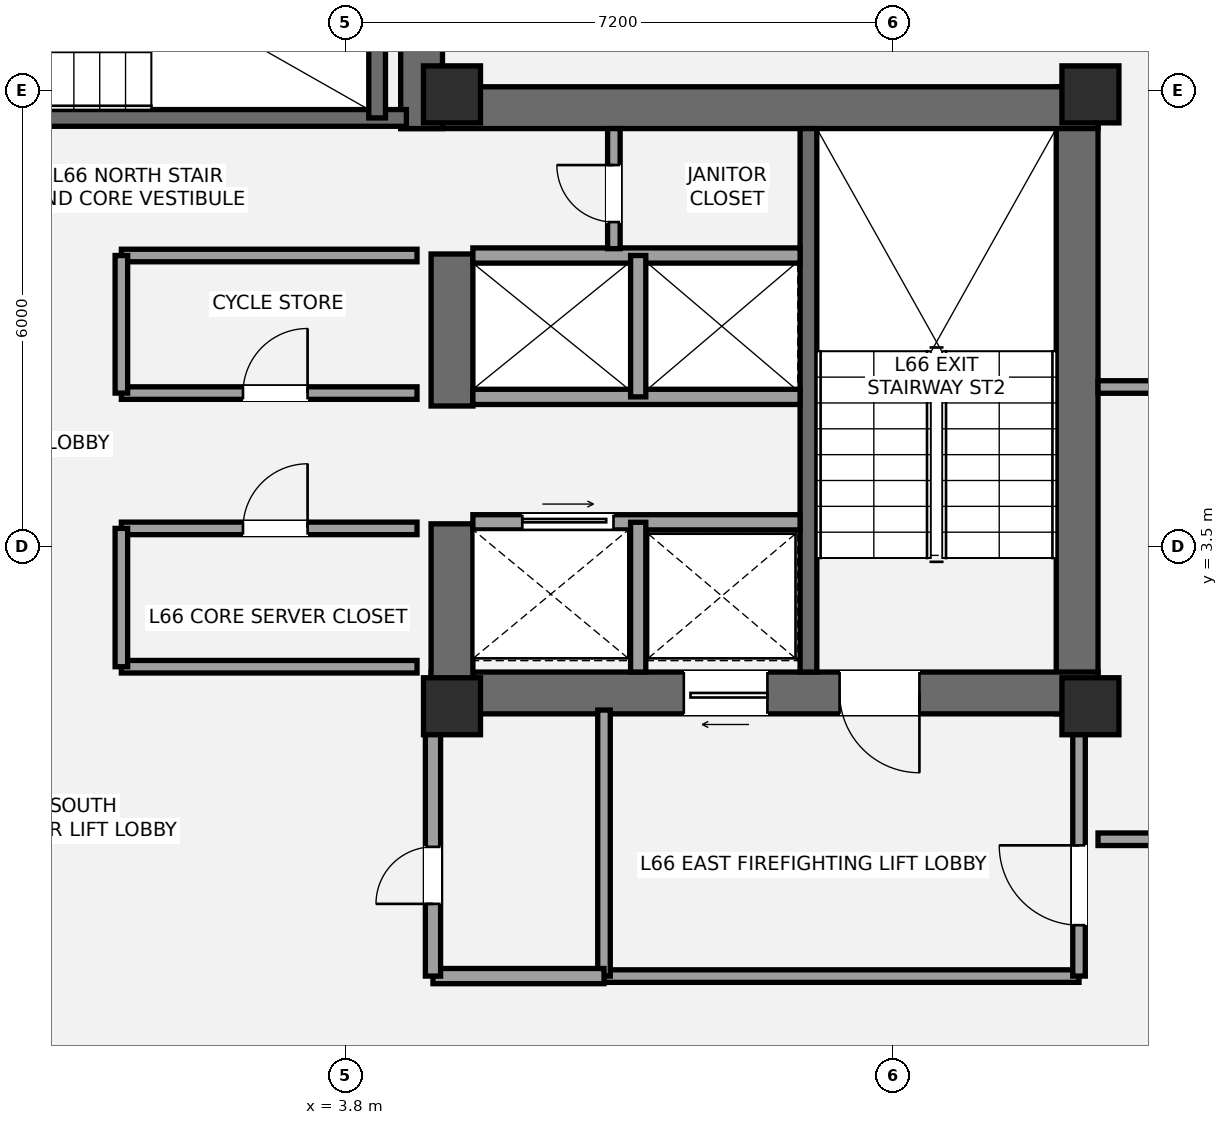
"""IFC4 building model, lengths in metres.
Left out: names, types, materials, properties, quantities, classifications, styles, units other than length and angle.
Written with IfcOpenShell. Run it as: python <this file> out.ifc"""

import sys

from ifc_helpers import new_model, si_unit, direction, frame, frame_2d, origin, origin_2d, place, context, subcontext, project, spatial, rectangle, extrude, element, fill, save


model = new_model("IFC4")
c1 = context("Model", 3, precision=1e-05, world=origin(), true_north=direction((0.0, 1.0)))
c2 = subcontext(c1, "Body", "Model", "MODEL_VIEW")
j1 = project(units=[si_unit("LENGTHUNIT", "METRE"), si_unit("PLANEANGLEUNIT", "RADIAN")], contexts=[c1])
p1 = place(None, origin())
s1 = spatial("IfcSite", under=j1, at=p1, CompositionType="ELEMENT")
p2 = place(p1, origin())
s2 = spatial("IfcBuilding", under=s1, at=p2, CompositionType="ELEMENT")
p3 = place(p2, frame((0.0, 0.0, 235.2)))
s3 = spatial("IfcBuildingStorey", under=s2, at=p3, CompositionType="ELEMENT", Elevation=235.2)
p4 = place(p3, frame((13.425, 1.3, 0.0), z_axis=(0.0, 0.0, 1.0), x_axis=(0.0, 1.0, 0.0)))
e1 = element("IfcWall", 1, at=p4, inside=s3, PredefinedType="SHEAR", context=c2, shape_type="SweptSolid", body=[
    extrude(rectangle(XDim=8.25, YDim=0.55, at=frame_2d((4.125, 0.0))), origin(), (0.0, 0.0, 1.0), 3.15),
])
p5 = place(p3, frame((4.525, 9.275, 0.0), z_axis=(0.0, 0.0, 1.0), x_axis=(1.0, 0.0, 0.0)))
e2 = element("IfcWall", 2, at=p5, inside=s3, PredefinedType="SHEAR", context=c2, shape_type="SweptSolid", body=[
    extrude(rectangle(XDim=9.175, YDim=0.55, at=frame_2d((4.587, 0.0))), origin(), (0.0, 0.0, 1.0), 3.15),
])
p6 = place(p3, frame((13.7, 1.575, 0.0), z_axis=(0.0, 0.0, 1.0), x_axis=(-1.0, 0.0, 0.0)))
e3 = element("IfcWall", 3, at=p6, inside=s3, PredefinedType="SHEAR", context=c2, shape_type="SweptSolid", body=[
    extrude(rectangle(XDim=8.775, YDim=0.55, at=frame_2d((4.387, 0.0))), origin(), (0.0, 0.0, 1.0), 3.15),
])
p7 = place(p6, frame((2.35, 0.0, 0.0)))
e4 = element("IfcOpeningElement", 4, at=p7, cuts=e3, PredefinedType="OPENING", context=c2, shape_type="SweptSolid", body=[
    extrude(rectangle(XDim=1.05, YDim=2.15, at=frame_2d((0.525, 1.075))), frame((0.0, 0.285, 0.0), z_axis=(0.0, -1.0, 0.0), x_axis=(1.0, 0.0, 0.0)), (0.0, 0.0, 1.0), 0.57),
])
p8 = place(p6, frame((4.35, 0.0, 0.0)))
e5 = element("IfcOpeningElement", 5, at=p8, cuts=e3, PredefinedType="OPENING", context=c2, shape_type="SweptSolid", body=[
    extrude(rectangle(XDim=1.1, YDim=2.2, at=frame_2d((0.55, 1.1))), frame((0.0, 0.285, 0.0), z_axis=(0.0, -1.0, 0.0), x_axis=(1.0, 0.0, 0.0)), (0.0, 0.0, 1.0), 0.57),
])
p9 = place(p3, frame((5.2, 1.3, 0.0), z_axis=(0.0, 0.0, 1.0), x_axis=(0.0, 1.0, 0.0)))
e6 = element("IfcWall", 6, at=p9, inside=s3, PredefinedType="SHEAR", context=c2, shape_type="SweptSolid", body=[
    extrude(rectangle(XDim=2.5, YDim=0.55, at=frame_2d((1.25, 0.0))), origin(), (0.0, 0.0, 1.0), 3.15),
])
p10 = place(p3, frame((5.2, 5.35, 0.0), z_axis=(0.0, 0.0, 1.0), x_axis=(0.0, 1.0, 0.0)))
e7 = element("IfcWall", 7, at=p10, inside=s3, PredefinedType="SHEAR", context=c2, shape_type="SweptSolid", body=[
    extrude(rectangle(XDim=2.0, YDim=0.55, at=frame_2d((1.0, 0.0))), origin(), (0.0, 0.0, 1.0), 3.15),
])
p11 = place(p3, frame((9.89, 1.85, 0.0), z_axis=(0.0, 0.0, 1.0), x_axis=(0.0, 1.0, 0.0)))
e8 = element("IfcWall", 8, at=p11, inside=s3, PredefinedType="SHEAR", context=c2, shape_type="SweptSolid", body=[
    extrude(rectangle(XDim=7.15, YDim=0.22, at=frame_2d((3.575, 0.0))), origin(), (0.0, 0.0, 1.0), 3.15),
])
p12 = place(p3, frame((4.8, 9.0, 0.0), z_axis=(0.0, 0.0, 1.0), x_axis=(0.0, 1.0, 0.0)))
e9 = element("IfcWall", 9, at=p12, inside=s3, PredefinedType="SHEAR", context=c2, shape_type="SweptSolid", body=[
    extrude(rectangle(XDim=3.95, YDim=0.55, at=frame_2d((1.975, 0.0))), origin(), (0.0, 0.0, 1.0), 3.15),
])
p13 = place(p3, frame((-4.7, 9.14, 0.0), z_axis=(0.0, 0.0, 1.0), x_axis=(1.0, 0.0, 0.0)))
e10 = element("IfcWall", 10, at=p13, inside=s3, PredefinedType="SHEAR", context=c2, shape_type="SweptSolid", body=[
    extrude(rectangle(XDim=9.3, YDim=0.22, at=frame_2d((4.65, 0.0))), origin(), (0.0, 0.0, 1.0), 3.15),
])
p14 = place(p13, frame((1.15, 0.0, 0.0)))
e11 = element("IfcOpeningElement", 11, at=p14, cuts=e10, PredefinedType="OPENING", context=c2, shape_type="SweptSolid", body=[
    extrude(rectangle(XDim=1.05, YDim=2.15, at=frame_2d((0.525, 1.075))), frame((0.0, 0.12, 0.0), z_axis=(0.0, -1.0, 0.0), x_axis=(1.0, 0.0, 0.0)), (0.0, 0.0, 1.0), 0.24),
])
p15 = place(p3, frame((4.215, 9.14, 0.0), z_axis=(0.0, 0.0, 1.0), x_axis=(0.0, 1.0, 0.0)))
e12 = element("IfcWall", 12, at=p15, inside=s3, PredefinedType="SHEAR", context=c2, shape_type="SweptSolid", body=[
    extrude(rectangle(XDim=3.26, YDim=0.22, at=frame_2d((1.63, 0.0))), origin(), (0.0, 0.0, 1.0), 3.15),
])
for number, where, z_axis, x_axis in (
    (13, (5.2, 1.4, 0.0), (0.0, 0.0, 1.0), (1.0, 0.0, 0.0)),
    (14, (5.2, 9.45, 0.0), (0.0, 0.0, 1.0), (1.0, 0.0, 0.0)),
    (15, (13.6, 1.4, 0.0), (0.0, 0.0, 1.0), (1.0, 0.0, 0.0)),
    (16, (13.6, 9.45, 0.0), (0.0, 0.0, 1.0), (1.0, 0.0, 0.0)),
):
    element("IfcColumn", number, at=place(p3, frame(where, z_axis=z_axis, x_axis=x_axis)), inside=s3, PredefinedType="PILASTER", context=c2, shape_type="SweptSolid", body=[
        extrude(rectangle(XDim=0.75, YDim=0.75, at=origin_2d()), origin(), (0.0, 0.0, 1.0), 3.15),
    ])
p16 = place(p3, frame((14.242, 11.688, 0.0), z_axis=(0.0, 0.0, 1.0), x_axis=(0.827637036896, -0.561263694851, 0.0)))
e17 = element("IfcWall", 17, at=p16, inside=s3, PredefinedType="STANDARD", context=c2, shape_type="SweptSolid", body=[
    extrude(rectangle(XDim=3.793, YDim=0.44, at=frame_2d((1.896, 0.0))), origin(), (0.0, 0.0, 1.0), 2.336),
])
p17 = place(p16, frame((1.494, 0.0, 0.55)))
e18 = element("IfcOpeningElement", 18, at=p17, cuts=e17, PredefinedType="OPENING", context=c2, shape_type="SweptSolid", body=[
    extrude(rectangle(XDim=1.75, YDim=1.55, at=frame_2d((0.875, 0.775))), frame((0.0, 0.23, 0.0), z_axis=(0.0, -1.0, 0.0), x_axis=(1.0, 0.0, 0.0)), (0.0, 0.0, 1.0), 0.46),
])
p18 = place(p3, frame((7.2, -2.15, 0.0), z_axis=(0.0, 0.0, 1.0), x_axis=(1.0, 0.0, 0.0)))
e19 = element("IfcWall", 19, at=p18, inside=s3, PredefinedType="PARTITIONING", context=c2, shape_type="SweptSolid", body=[
    extrude(rectangle(XDim=6.25, YDim=0.165, at=frame_2d((3.125, 0.0))), origin(), (0.0, 0.0, 1.0), 2.97),
])
p19 = place(p3, frame((7.2, -2.15, 0.0), z_axis=(0.0, 0.0, 1.0), x_axis=(0.0, 1.0, 0.0)))
e20 = element("IfcWall", 20, at=p19, inside=s3, PredefinedType="PARTITIONING", context=c2, shape_type="SweptSolid", body=[
    extrude(rectangle(XDim=3.5, YDim=0.165, at=frame_2d((1.75, 0.0))), origin(), (0.0, 0.0, 1.0), 2.423),
])
p20 = place(p3, frame((13.45, -2.15, 0.0), z_axis=(0.0, 0.0, 1.0), x_axis=(0.0, 1.0, 0.0)))
e21 = element("IfcWall", 21, at=p20, inside=s3, PredefinedType="PARTITIONING", context=c2, shape_type="SweptSolid", body=[
    extrude(rectangle(XDim=3.5, YDim=0.165, at=frame_2d((1.75, 0.0))), origin(), (0.0, 0.0, 1.0), 2.423),
])
p21 = place(p20, frame((0.67, 0.0, 0.0)))
e22 = element("IfcOpeningElement", 22, at=p21, cuts=e21, PredefinedType="OPENING", context=c2, shape_type="SweptSolid", body=[
    extrude(rectangle(XDim=1.05, YDim=2.15, at=frame_2d((0.525, 1.075))), frame((0.0, 0.093, 0.0), z_axis=(0.0, -1.0, 0.0), x_axis=(1.0, 0.0, 0.0)), (0.0, 0.0, 1.0), 0.185),
])
p22 = place(p3, frame((4.95, -2.15, 0.0), z_axis=(0.0, 0.0, 1.0), x_axis=(1.0, 0.0, 0.0)))
e23 = element("IfcWall", 23, at=p22, inside=s3, PredefinedType="SOLIDWALL", context=c2, shape_type="SweptSolid", body=[
    extrude(rectangle(XDim=2.25, YDim=0.2, at=frame_2d((1.125, 0.0))), origin(), (0.0, 0.0, 1.0), 2.97),
])
p23 = place(p3, frame((4.95, -2.15, 0.0), z_axis=(0.0, 0.0, 1.0), x_axis=(0.0, 1.0, 0.0)))
e24 = element("IfcWall", 24, at=p23, inside=s3, PredefinedType="SOLIDWALL", context=c2, shape_type="SweptSolid", body=[
    extrude(rectangle(XDim=3.5, YDim=0.2, at=frame_2d((1.75, 0.0))), origin(), (0.0, 0.0, 1.0), 2.423),
])
p24 = place(p23, frame((0.95, 0.0, 0.0)))
e25 = element("IfcOpeningElement", 25, at=p24, cuts=e24, PredefinedType="OPENING", context=c2, shape_type="SweptSolid", body=[
    extrude(rectangle(XDim=0.75, YDim=2.1, at=frame_2d((0.375, 1.05))), frame((0.0, 0.11, 0.0), z_axis=(0.0, -1.0, 0.0), x_axis=(1.0, 0.0, 0.0)), (0.0, 0.0, 1.0), 0.22),
])
p25 = place(p3, frame((5.475, 3.82, 0.0), z_axis=(0.0, 0.0, 1.0), x_axis=(1.0, 0.0, 0.0)))
e26 = element("IfcWall", 26, at=p25, inside=s3, PredefinedType="SOLIDWALL", context=c2, shape_type="SweptSolid", body=[
    extrude(rectangle(XDim=4.305, YDim=0.2, at=frame_2d((2.152, 0.0))), origin(), (0.0, 0.0, 1.0), 2.97),
])
p26 = place(p25, frame((0.65, 0.0, 0.0)))
e27 = element("IfcOpeningElement", 27, at=p26, cuts=e26, PredefinedType="OPENING", context=c2, shape_type="SweptSolid", body=[
    extrude(rectangle(XDim=1.2, YDim=2.2, at=frame_2d((0.6, 1.1))), frame((0.0, 0.11, 0.0), z_axis=(0.0, -1.0, 0.0), x_axis=(1.0, 0.0, 0.0)), (0.0, 0.0, 1.0), 0.22),
])
p27 = place(p3, frame((7.65, 1.85, 0.0), z_axis=(0.0, 0.0, 1.0), x_axis=(0.0, 1.0, 0.0)))
e28 = element("IfcWall", 28, at=p27, inside=s3, PredefinedType="SOLIDWALL", context=c2, shape_type="SweptSolid", body=[
    extrude(rectangle(XDim=1.97, YDim=0.2, at=frame_2d((0.985, 0.0))), origin(), (0.0, 0.0, 1.0), 2.97),
])
for number, where, z_axis, x_axis in (
    (29, (5.475, 5.47, 0.0), (0.0, 0.0, 1.0), (1.0, 0.0, 0.0)),
    (30, (5.475, 7.33, 0.0), (0.0, 0.0, 1.0), (1.0, 0.0, 0.0)),
):
    element("IfcWall", number, at=place(p3, frame(where, z_axis=z_axis, x_axis=x_axis)), inside=s3, PredefinedType="SOLIDWALL", context=c2, shape_type="SweptSolid", body=[
        extrude(rectangle(XDim=4.305, YDim=0.2, at=frame_2d((2.152, 0.0))), origin(), (0.0, 0.0, 1.0), 2.97),
    ])
p28 = place(p3, frame((7.65, 5.47, 0.0), z_axis=(0.0, 0.0, 1.0), x_axis=(0.0, 1.0, 0.0)))
e31 = element("IfcWall", 31, at=p28, inside=s3, PredefinedType="SOLIDWALL", context=c2, shape_type="SweptSolid", body=[
    extrude(rectangle(XDim=1.86, YDim=0.2, at=frame_2d((0.93, 0.0))), origin(), (0.0, 0.0, 1.0), 2.97),
])
p29 = place(p3, frame((0.85, 1.92, 0.0), z_axis=(0.0, 0.0, 1.0), x_axis=(1.0, 0.0, 0.0)))
e32 = element("IfcWall", 32, at=p29, inside=s3, PredefinedType="PARTITIONING", context=c2, shape_type="SweptSolid", body=[
    extrude(rectangle(XDim=3.89, YDim=0.165, at=frame_2d((1.945, 0.0))), origin(), (0.0, 0.0, 1.0), 2.11),
])
p30 = place(p3, frame((0.85, 3.74, 0.0), z_axis=(0.0, 0.0, 1.0), x_axis=(1.0, 0.0, 0.0)))
e33 = element("IfcWall", 33, at=p30, inside=s3, PredefinedType="PARTITIONING", context=c2, shape_type="SweptSolid", body=[
    extrude(rectangle(XDim=3.89, YDim=0.165, at=frame_2d((1.945, 0.0))), origin(), (0.0, 0.0, 1.0), 2.97),
])
p31 = place(p30, frame((1.6, 0.0, 0.0)))
e34 = element("IfcOpeningElement", 34, at=p31, cuts=e33, PredefinedType="OPENING", context=c2, shape_type="SweptSolid", body=[
    extrude(rectangle(XDim=0.85, YDim=2.1, at=frame_2d((0.425, 1.05))), frame((0.0, 0.093, 0.0), z_axis=(0.0, -1.0, 0.0), x_axis=(1.0, 0.0, 0.0)), (0.0, 0.0, 1.0), 0.185),
])
p32 = place(p3, frame((0.85, 1.92, 0.0), z_axis=(0.0, 0.0, 1.0), x_axis=(0.0, 1.0, 0.0)))
e35 = element("IfcWall", 35, at=p32, inside=s3, PredefinedType="PARTITIONING", context=c2, shape_type="SweptSolid", body=[
    extrude(rectangle(XDim=1.82, YDim=0.165, at=frame_2d((0.91, 0.0))), origin(), (0.0, 0.0, 1.0), 2.97),
])
p33 = place(p3, frame((0.85, 5.52, 0.0), z_axis=(0.0, 0.0, 1.0), x_axis=(1.0, 0.0, 0.0)))
e36 = element("IfcWall", 36, at=p33, inside=s3, PredefinedType="PARTITIONING", context=c2, shape_type="SweptSolid", body=[
    extrude(rectangle(XDim=3.89, YDim=0.165, at=frame_2d((1.945, 0.0))), origin(), (0.0, 0.0, 1.0), 2.97),
])
p34 = place(p33, frame((1.6, 0.0, 0.0)))
e37 = element("IfcOpeningElement", 37, at=p34, cuts=e36, PredefinedType="OPENING", context=c2, shape_type="SweptSolid", body=[
    extrude(rectangle(XDim=0.85, YDim=2.1, at=frame_2d((0.425, 1.05))), frame((0.0, 0.093, 0.0), z_axis=(0.0, -1.0, 0.0), x_axis=(1.0, 0.0, 0.0)), (0.0, 0.0, 1.0), 0.185),
])
p35 = place(p3, frame((0.85, 7.33, 0.0), z_axis=(0.0, 0.0, 1.0), x_axis=(1.0, 0.0, 0.0)))
e38 = element("IfcWall", 38, at=p35, inside=s3, PredefinedType="PARTITIONING", context=c2, shape_type="SweptSolid", body=[
    extrude(rectangle(XDim=3.89, YDim=0.165, at=frame_2d((1.945, 0.0))), origin(), (0.0, 0.0, 1.0), 2.97),
])
p36 = place(p3, frame((0.85, 5.52, 0.0), z_axis=(0.0, 0.0, 1.0), x_axis=(0.0, 1.0, 0.0)))
e39 = element("IfcWall", 39, at=p36, inside=s3, PredefinedType="PARTITIONING", context=c2, shape_type="SweptSolid", body=[
    extrude(rectangle(XDim=1.81, YDim=0.165, at=frame_2d((0.905, 0.0))), origin(), (0.0, 0.0, 1.0), 2.97),
])
p37 = place(p3, frame((7.33, 7.42, 0.0), z_axis=(0.0, 0.0, 1.0), x_axis=(0.0, 1.0, 0.0)))
e40 = element("IfcWall", 40, at=p37, inside=s3, PredefinedType="PARTITIONING", context=c2, shape_type="SweptSolid", body=[
    extrude(rectangle(XDim=1.58, YDim=0.165, at=frame_2d((0.79, 0.0))), origin(), (0.0, 0.0, 1.0), 2.97),
])
p38 = place(p37, frame((0.35, 0.0, 0.0)))
e41 = element("IfcOpeningElement", 41, at=p38, cuts=e40, PredefinedType="OPENING", context=c2, shape_type="SweptSolid", body=[
    extrude(rectangle(XDim=0.75, YDim=2.1, at=frame_2d((0.375, 1.05))), frame((0.0, 0.093, 0.0), z_axis=(0.0, -1.0, 0.0), x_axis=(1.0, 0.0, 0.0)), (0.0, 0.0, 1.0), 0.185),
])
p39 = place(p3, frame((13.7, -0.35, 0.0), z_axis=(0.0, 0.0, 1.0), x_axis=(1.0, 0.0, 0.0)))
e42 = element("IfcWall", 42, at=p39, inside=s3, PredefinedType="PARTITIONING", context=c2, shape_type="SweptSolid", body=[
    extrude(rectangle(XDim=2.3, YDim=0.165, at=frame_2d((1.15, 0.0))), origin(), (0.0, 0.0, 1.0), 2.423),
])
p40 = place(p3, frame((13.7, 5.6, 0.0), z_axis=(0.0, 0.0, 1.0), x_axis=(1.0, 0.0, 0.0)))
e43 = element("IfcWall", 43, at=p40, inside=s3, PredefinedType="PARTITIONING", context=c2, shape_type="SweptSolid", body=[
    extrude(rectangle(XDim=6.36, YDim=0.165, at=frame_2d((3.18, 0.0))), origin(), (0.0, 0.0, 1.0), 2.423),
])
p41 = place(p40, frame((3.101, 0.0, 0.0)))
e44 = element("IfcOpeningElement", 44, at=p41, cuts=e43, PredefinedType="OPENING", context=c2, shape_type="SweptSolid", body=[
    extrude(rectangle(XDim=0.9, YDim=2.1, at=frame_2d((0.45, 1.05))), frame((0.0, 0.093, 0.0), z_axis=(0.0, -1.0, 0.0), x_axis=(1.0, 0.0, 0.0)), (0.0, 0.0, 1.0), 0.185),
])
p42 = place(p7, origin())
e45 = element("IfcDoor", 45, at=p42, inside=s3, OperationType="SINGLE_SWING_LEFT", PredefinedType="DOOR", context=c2, shape_type="SweptSolid", body=[
    extrude(rectangle(XDim=1.05, YDim=2.15, at=frame_2d((0.525, 1.075))), frame((0.0, 0.025, 0.0), z_axis=(0.0, -1.0, 0.0), x_axis=(1.0, 0.0, 0.0)), (0.0, 0.0, 1.0), 0.05),
])
fill(e4, e45)
p43 = place(p21, origin())
e46 = element("IfcDoor", 46, at=p43, inside=s3, OperationType="SINGLE_SWING_RIGHT", PredefinedType="DOOR", context=c2, shape_type="SweptSolid", body=[
    extrude(rectangle(XDim=1.05, YDim=2.15, at=frame_2d((0.525, 1.075))), frame((0.0, 0.025, 0.0), z_axis=(0.0, -1.0, 0.0), x_axis=(1.0, 0.0, 0.0)), (0.0, 0.0, 1.0), 0.05),
])
fill(e22, e46)
p44 = place(p24, origin())
e47 = element("IfcDoor", 47, at=p44, inside=s3, OperationType="SINGLE_SWING_LEFT", PredefinedType="DOOR", context=c2, shape_type="SweptSolid", body=[
    extrude(rectangle(XDim=0.75, YDim=2.1, at=frame_2d((0.375, 1.05))), frame((0.0, 0.025, 0.0), z_axis=(0.0, -1.0, 0.0), x_axis=(1.0, 0.0, 0.0)), (0.0, 0.0, 1.0), 0.05),
])
fill(e25, e47)
p45 = place(p8, origin())
e48 = element("IfcDoor", 48, at=p45, inside=s3, OperationType="SLIDING_TO_LEFT", PredefinedType="DOOR", context=c2, shape_type="SweptSolid", body=[
    extrude(rectangle(XDim=1.1, YDim=2.2, at=frame_2d((0.55, 1.1))), frame((0.0, 0.025, 0.0), z_axis=(0.0, -1.0, 0.0), x_axis=(1.0, 0.0, 0.0)), (0.0, 0.0, 1.0), 0.05),
])
fill(e5, e48)
p46 = place(p26, origin())
e49 = element("IfcDoor", 49, at=p46, inside=s3, OperationType="SLIDING_TO_RIGHT", PredefinedType="DOOR", context=c2, shape_type="SweptSolid", body=[
    extrude(rectangle(XDim=1.2, YDim=2.2, at=frame_2d((0.6, 1.1))), frame((0.0, 0.025, 0.0), z_axis=(0.0, -1.0, 0.0), x_axis=(1.0, 0.0, 0.0)), (0.0, 0.0, 1.0), 0.05),
])
fill(e27, e49)
p47 = place(p31, origin())
e50 = element("IfcDoor", 50, at=p47, inside=s3, OperationType="SINGLE_SWING_RIGHT", PredefinedType="DOOR", context=c2, shape_type="SweptSolid", body=[
    extrude(rectangle(XDim=0.85, YDim=2.1, at=frame_2d((0.425, 1.05))), frame((0.0, 0.025, 0.0), z_axis=(0.0, -1.0, 0.0), x_axis=(1.0, 0.0, 0.0)), (0.0, 0.0, 1.0), 0.05),
])
fill(e34, e50)
p48 = place(p34, origin())
e51 = element("IfcDoor", 51, at=p48, inside=s3, OperationType="SINGLE_SWING_RIGHT", PredefinedType="DOOR", context=c2, shape_type="SweptSolid", body=[
    extrude(rectangle(XDim=0.85, YDim=2.1, at=frame_2d((0.425, 1.05))), frame((0.0, 0.025, 0.0), z_axis=(0.0, -1.0, 0.0), x_axis=(1.0, 0.0, 0.0)), (0.0, 0.0, 1.0), 0.05),
])
fill(e37, e51)
p49 = place(p38, origin())
e52 = element("IfcDoor", 52, at=p49, inside=s3, OperationType="SINGLE_SWING_RIGHT", PredefinedType="DOOR", context=c2, shape_type="SweptSolid", body=[
    extrude(rectangle(XDim=0.75, YDim=2.1, at=frame_2d((0.375, 1.05))), frame((0.0, 0.025, 0.0), z_axis=(0.0, -1.0, 0.0), x_axis=(1.0, 0.0, 0.0)), (0.0, 0.0, 1.0), 0.05),
])
fill(e41, e52)
save(model, sys.argv[1])
